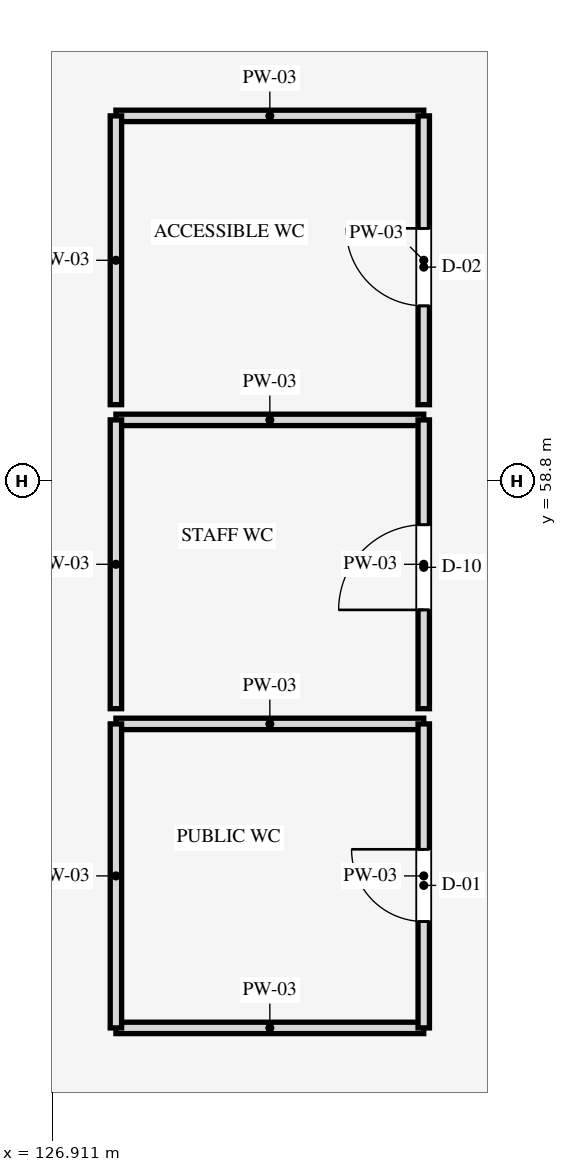
"""IFC4 building model, lengths in metres.
Left out: names, types, materials, properties, quantities, classifications, styles, units other than length and angle.
Written with IfcOpenShell. Run it as: python <this file> out.ifc"""

import sys

from ifc_helpers import new_model, si_unit, direction, frame, frame_2d, origin, place, context, subcontext, project, spatial, rectangle, extrude, element, fill, save


model = new_model("IFC4")
c1 = context("Model", 3, precision=1e-05, world=origin(), true_north=direction((0.0, 1.0)))
c2 = subcontext(c1, "Body", "Model", "MODEL_VIEW")
j1 = project(units=[si_unit("LENGTHUNIT", "METRE"), si_unit("PLANEANGLEUNIT", "RADIAN")], contexts=[c1])
p1 = place(None, origin())
s1 = spatial("IfcSite", under=j1, at=p1, CompositionType="ELEMENT")
p2 = place(p1, origin())
s2 = spatial("IfcBuilding", under=s1, at=p2, CompositionType="ELEMENT")
p3 = place(p2, frame((0.0, 0.0, -5.4)))
s3 = spatial("IfcBuildingStorey", under=s2, at=p3, CompositionType="ELEMENT", Elevation=-5.4)
for number, where, z_axis, x_axis in (
    (1, (127.75, 51.6, 0.0), (0.0, 0.0, 1.0), (1.0, 0.0, 0.0)),
    (2, (127.75, 55.6, 0.0), (0.0, 0.0, 1.0), (1.0, 0.0, 0.0)),
):
    element("IfcWall", number, at=place(p3, frame(where, z_axis=z_axis, x_axis=x_axis)), inside=s3, PredefinedType="PARTITIONING", context=c2, shape_type="SweptSolid", body=[
        extrude(rectangle(XDim=4.05, YDim=0.15, at=frame_2d((2.025, 0.0))), origin(), (0.0, 0.0, 1.0), 4.44),
    ])
p4 = place(p3, frame((127.75, 51.6, 0.0), z_axis=(0.0, 0.0, 1.0), x_axis=(0.0, 1.0, 0.0)))
e3 = element("IfcWall", 3, at=p4, inside=s3, PredefinedType="PARTITIONING", context=c2, shape_type="SweptSolid", body=[
    extrude(rectangle(XDim=4.0, YDim=0.15, at=frame_2d((2.0, 0.0))), origin(), (0.0, 0.0, 1.0), 4.44),
])
p5 = place(p3, frame((131.8, 51.6, 0.0), z_axis=(0.0, 0.0, 1.0), x_axis=(0.0, 1.0, 0.0)))
e4 = element("IfcWall", 4, at=p5, inside=s3, PredefinedType="PARTITIONING", context=c2, shape_type="SweptSolid", body=[
    extrude(rectangle(XDim=4.0, YDim=0.15, at=frame_2d((2.0, 0.0))), origin(), (0.0, 0.0, 1.0), 4.44),
])
p6 = place(p5, frame((1.4, 0.0, 0.0)))
e5 = element("IfcOpeningElement", 5, at=p6, cuts=e4, PredefinedType="OPENING", context=c2, shape_type="SweptSolid", body=[
    extrude(rectangle(XDim=0.95, YDim=2.1, at=frame_2d((0.475, 1.05))), frame((0.0, 0.085, 0.0), z_axis=(0.0, -1.0, 0.0), x_axis=(1.0, 0.0, 0.0)), (0.0, 0.0, 1.0), 0.17),
])
p7 = place(p3, frame((127.75, 59.6, 0.0), z_axis=(0.0, 0.0, 1.0), x_axis=(1.0, 0.0, 0.0)))
e6 = element("IfcWall", 6, at=p7, inside=s3, PredefinedType="PARTITIONING", context=c2, shape_type="SweptSolid", body=[
    extrude(rectangle(XDim=4.05, YDim=0.15, at=frame_2d((2.025, 0.0))), origin(), (0.0, 0.0, 1.0), 4.44),
])
p8 = place(p3, frame((127.75, 55.8, 0.0), z_axis=(0.0, 0.0, 1.0), x_axis=(0.0, 1.0, 0.0)))
e7 = element("IfcWall", 7, at=p8, inside=s3, PredefinedType="PARTITIONING", context=c2, shape_type="SweptSolid", body=[
    extrude(rectangle(XDim=3.8, YDim=0.15, at=frame_2d((1.9, 0.0))), origin(), (0.0, 0.0, 1.0), 4.44),
])
p9 = place(p3, frame((131.8, 55.8, 0.0), z_axis=(0.0, 0.0, 1.0), x_axis=(0.0, 1.0, 0.0)))
e8 = element("IfcWall", 8, at=p9, inside=s3, PredefinedType="PARTITIONING", context=c2, shape_type="SweptSolid", body=[
    extrude(rectangle(XDim=3.8, YDim=0.15, at=frame_2d((1.9, 0.0))), origin(), (0.0, 0.0, 1.0), 4.44),
])
p10 = place(p9, frame((1.3, 0.0, 0.0)))
e9 = element("IfcOpeningElement", 9, at=p10, cuts=e8, PredefinedType="OPENING", context=c2, shape_type="SweptSolid", body=[
    extrude(rectangle(XDim=1.12, YDim=2.14, at=frame_2d((0.56, 1.07))), frame((0.0, 0.085, 0.0), z_axis=(0.0, -1.0, 0.0), x_axis=(1.0, 0.0, 0.0)), (0.0, 0.0, 1.0), 0.17),
])
p11 = place(p3, frame((127.75, 63.6, 0.0), z_axis=(0.0, 0.0, 1.0), x_axis=(1.0, 0.0, 0.0)))
e10 = element("IfcWall", 10, at=p11, inside=s3, PredefinedType="PARTITIONING", context=c2, shape_type="SweptSolid", body=[
    extrude(rectangle(XDim=4.05, YDim=0.15, at=frame_2d((2.025, 0.0))), origin(), (0.0, 0.0, 1.0), 4.44),
])
p12 = place(p3, frame((127.75, 59.8, 0.0), z_axis=(0.0, 0.0, 1.0), x_axis=(0.0, 1.0, 0.0)))
e11 = element("IfcWall", 11, at=p12, inside=s3, PredefinedType="PARTITIONING", context=c2, shape_type="SweptSolid", body=[
    extrude(rectangle(XDim=3.8, YDim=0.15, at=frame_2d((1.9, 0.0))), origin(), (0.0, 0.0, 1.0), 4.44),
])
p13 = place(p3, frame((131.8, 59.8, 0.0), z_axis=(0.0, 0.0, 1.0), x_axis=(0.0, 1.0, 0.0)))
e12 = element("IfcWall", 12, at=p13, inside=s3, PredefinedType="PARTITIONING", context=c2, shape_type="SweptSolid", body=[
    extrude(rectangle(XDim=3.8, YDim=0.15, at=frame_2d((1.9, 0.0))), origin(), (0.0, 0.0, 1.0), 4.44),
])
p14 = place(p13, frame((1.3, 0.0, 0.0)))
e13 = element("IfcOpeningElement", 13, at=p14, cuts=e12, PredefinedType="OPENING", context=c2, shape_type="SweptSolid", body=[
    extrude(rectangle(XDim=1.02, YDim=2.1, at=frame_2d((0.51, 1.05))), frame((0.0, 0.085, 0.0), z_axis=(0.0, -1.0, 0.0), x_axis=(1.0, 0.0, 0.0)), (0.0, 0.0, 1.0), 0.17),
])
p15 = place(p6, origin())
e14 = element("IfcDoor", 14, at=p15, inside=s3, OperationType="SINGLE_SWING_RIGHT", PredefinedType="DOOR", context=c2, shape_type="SweptSolid", body=[
    extrude(rectangle(XDim=0.95, YDim=2.1, at=frame_2d((0.475, 1.05))), frame((0.0, 0.025, 0.0), z_axis=(0.0, -1.0, 0.0), x_axis=(1.0, 0.0, 0.0)), (0.0, 0.0, 1.0), 0.05),
])
fill(e5, e14)
p16 = place(p10, origin())
e15 = element("IfcDoor", 15, at=p16, inside=s3, OperationType="SINGLE_SWING_LEFT", PredefinedType="DOOR", context=c2, shape_type="SweptSolid", body=[
    extrude(rectangle(XDim=1.12, YDim=2.14, at=frame_2d((0.56, 1.07))), frame((0.0, 0.025, 0.0), z_axis=(0.0, -1.0, 0.0), x_axis=(1.0, 0.0, 0.0)), (0.0, 0.0, 1.0), 0.05),
])
fill(e9, e15)
p17 = place(p14, origin())
e16 = element("IfcDoor", 16, at=p17, inside=s3, OperationType="SINGLE_SWING_RIGHT", PredefinedType="DOOR", context=c2, shape_type="SweptSolid", body=[
    extrude(rectangle(XDim=1.02, YDim=2.1, at=frame_2d((0.51, 1.05))), frame((0.0, 0.025, 0.0), z_axis=(0.0, -1.0, 0.0), x_axis=(1.0, 0.0, 0.0)), (0.0, 0.0, 1.0), 0.05),
])
fill(e13, e16)
save(model, sys.argv[1])
